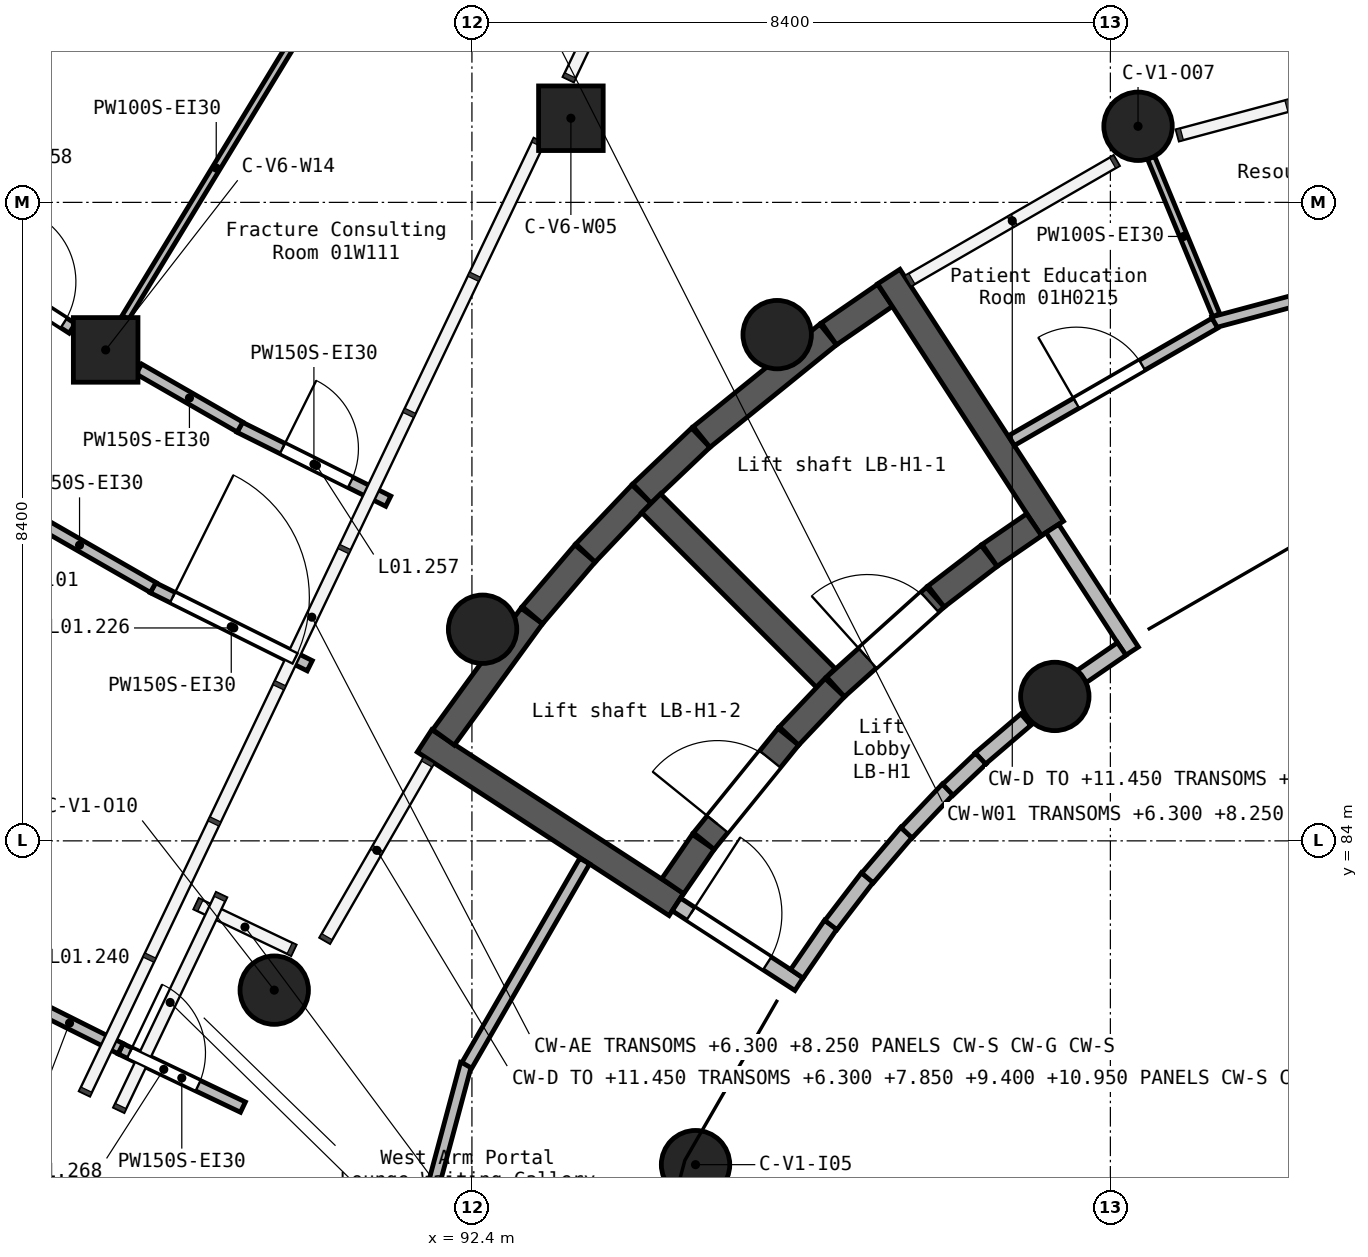
"""IFC4 building model, lengths in metres.
Left out: names, types, materials, properties, quantities, classifications, styles, units other than length and angle.
Written with IfcOpenShell. Run it as: python <this file> out.ifc"""

import sys

from ifc_helpers import new_model, si_unit, direction, frame, frame_2d, origin, origin_2d, place, context, subcontext, project, spatial, rectangle, circle, extrude, element, fill, save


model = new_model("IFC4")
c1 = context("Model", 3, precision=1e-05, world=origin(), true_north=direction((0.0, 1.0)))
c2 = subcontext(c1, "Body", "Model", "MODEL_VIEW")
j1 = project(units=[si_unit("LENGTHUNIT", "METRE"), si_unit("PLANEANGLEUNIT", "RADIAN")], contexts=[c1])
p1 = place(None, origin())
s1 = spatial("IfcSite", under=j1, at=p1, CompositionType="ELEMENT")
p2 = place(p1, origin())
s2 = spatial("IfcBuilding", under=s1, at=p2, CompositionType="ELEMENT")
p3 = place(p2, frame((0.0, 0.0, 5.4)))
s3 = spatial("IfcBuildingStorey", under=s2, at=p3, CompositionType="ELEMENT", Elevation=5.4)
p4 = place(p3, frame((87.581, 90.459, 0.0), z_axis=(0.0, 0.0, 1.0), x_axis=(1.0, 0.0, 0.0)))
e1 = element("IfcColumn", 1, at=p4, inside=s3, PredefinedType="COLUMN", context=c2, shape_type="SweptSolid", body=[
    extrude(rectangle(XDim=0.85, YDim=0.85, at=origin_2d()), origin(), (0.0, 0.0, 1.0), 4.5),
])
for number, where, z_axis, x_axis in (
    (2, (89.799, 82.036, 0.0), (0.0, 0.0, 1.0), (1.0, 0.0, 0.0)),
    (3, (92.54, 86.784, 0.0), (0.0, 0.0, 1.0), (1.0, 0.0, 0.0)),
):
    element("IfcColumn", number, at=place(p3, frame(where, z_axis=z_axis, x_axis=x_axis)), inside=s3, PredefinedType="COLUMN", context=c2, shape_type="SweptSolid", body=[
        extrude(circle(Radius=0.45, at=origin_2d()), origin(), (0.0, 0.0, 1.0), 4.5),
    ])
p5 = place(p3, frame((93.702, 93.507, 0.0), z_axis=(0.0, 0.0, 1.0), x_axis=(1.0, 0.0, 0.0)))
e4 = element("IfcColumn", 4, at=p5, inside=s3, PredefinedType="COLUMN", context=c2, shape_type="SweptSolid", body=[
    extrude(rectangle(XDim=0.85, YDim=0.85, at=origin_2d()), origin(), (0.0, 0.0, 1.0), 4.5),
])
for number, where, z_axis, x_axis in (
    (5, (95.342, 79.74, 0.0), (0.0, 0.0, 1.0), (1.0, 0.0, 0.0)),
    (6, (96.416, 90.66, 0.0), (0.0, 0.0, 1.0), (1.0, 0.0, 0.0)),
    (7, (100.069, 85.9, 0.0), (0.0, 0.0, 1.0), (1.0, 0.0, 0.0)),
    (8, (101.164, 93.401, 0.0), (0.0, 0.0, 1.0), (1.0, 0.0, 0.0)),
):
    element("IfcColumn", number, at=place(p3, frame(where, z_axis=z_axis, x_axis=x_axis)), inside=s3, PredefinedType="COLUMN", context=c2, shape_type="SweptSolid", body=[
        extrude(circle(Radius=0.45, at=origin_2d()), origin(), (0.0, 0.0, 1.0), 4.5),
    ])
p6 = place(p3, frame((91.776, 85.315, 0.0), z_axis=(0.0, 0.0, 1.0), x_axis=(0.838710342359, -0.544577782893, 0.0)))
e9 = element("IfcWall", 9, at=p6, inside=s3, PredefinedType="SHEAR", context=c2, shape_type="SweptSolid", body=[
    extrude(rectangle(XDim=3.951, YDim=0.35, at=frame_2d((1.976, 0.0))), origin(), (0.0, 0.0, 1.0), 4.5),
])
p7 = place(p3, frame((93.187, 86.958, 0.0), z_axis=(0.0, 0.0, 1.0), x_axis=(-0.588083467619, -0.808800244259, 0.0)))
e10 = element("IfcWall", 10, at=p7, inside=s3, PredefinedType="SHEAR", context=c2, shape_type="SweptSolid", body=[
    extrude(rectangle(XDim=1.974, YDim=0.35, at=frame_2d((0.987, 0.0))), origin(), (0.0, 0.0, 1.0), 4.5),
])
p8 = place(p3, frame((93.195, 86.969, 0.0), z_axis=(0.0, 0.0, 1.0), x_axis=(0.649301127712, 0.760531423119, 0.0)))
e11 = element("IfcWall", 11, at=p8, inside=s3, PredefinedType="SHEAR", context=c2, shape_type="SweptSolid", body=[
    extrude(rectangle(XDim=1.067, YDim=0.35, at=frame_2d((0.533, 0.0))), origin(), (0.0, 0.0, 1.0), 4.5),
])
p9 = place(p3, frame((93.894, 87.787, 0.0), z_axis=(0.0, 0.0, 1.0), x_axis=(0.688725463476, 0.725022231356, 0.0)))
e12 = element("IfcWall", 12, at=p9, inside=s3, PredefinedType="SHEAR", context=c2, shape_type="SweptSolid", body=[
    extrude(rectangle(XDim=1.07, YDim=0.35, at=frame_2d((0.535, 0.0))), origin(), (0.0, 0.0, 1.0), 4.5),
])
p10 = place(p3, frame((94.637, 88.569, 0.0), z_axis=(0.0, 0.0, 1.0), x_axis=(0.724948027673, 0.688803569367, 0.0)))
e13 = element("IfcWall", 13, at=p10, inside=s3, PredefinedType="SHEAR", context=c2, shape_type="SweptSolid", body=[
    extrude(rectangle(XDim=1.067, YDim=0.35, at=frame_2d((0.534, 0.0))), origin(), (0.0, 0.0, 1.0), 4.5),
])
p11 = place(p3, frame((94.758, 88.442, 0.0), z_axis=(0.0, 0.0, 1.0), x_axis=(0.707106781187, -0.707106781187, 0.0)))
e14 = element("IfcWall", 14, at=p11, inside=s3, PredefinedType="SHEAR", context=c2, shape_type="SweptSolid", body=[
    extrude(rectangle(XDim=3.249, YDim=0.35, at=frame_2d((1.625, 0.0))), origin(), (0.0, 0.0, 1.0), 4.5),
])
p12 = place(p3, frame((95.042, 83.403, 0.0), z_axis=(0.0, 0.0, 1.0), x_axis=(0.566587399165, 0.824001649942, 0.0)))
e15 = element("IfcWall", 15, at=p12, inside=s3, PredefinedType="SHEAR", context=c2, shape_type="SweptSolid", body=[
    extrude(rectangle(XDim=0.708, YDim=0.35, at=frame_2d((0.354, 0.0))), origin(), (0.0, 0.0, 1.0), 4.5),
])
p13 = place(p3, frame((95.451, 83.997, 0.0), z_axis=(0.0, 0.0, 1.0), x_axis=(0.629337420675, 0.777132170829, 0.0)))
e16 = element("IfcWall", 16, at=p13, inside=s3, PredefinedType="SHEAR", context=c2, shape_type="SweptSolid", body=[
    extrude(rectangle(XDim=1.766, YDim=0.35, at=frame_2d((0.883, 0.0))), origin(), (0.0, 0.0, 1.0), 4.5),
])
p14 = place(p13, frame((0.286, 0.0, 0.0)))
e17 = element("IfcOpeningElement", 17, at=p14, cuts=e16, PredefinedType="OPENING", context=c2, shape_type="SweptSolid", body=[
    extrude(rectangle(XDim=1.1, YDim=2.1, at=frame_2d((0.55, 1.05))), frame((0.0, 0.185, 0.0), z_axis=(0.0, -1.0, 0.0), x_axis=(1.0, 0.0, 0.0)), (0.0, 0.0, 1.0), 0.37),
])
p15 = place(p3, frame((96.572, 85.38, 0.0), z_axis=(0.0, 0.0, 1.0), x_axis=(0.687613208908, 0.726077182491, 0.0)))
e18 = element("IfcWall", 18, at=p15, inside=s3, PredefinedType="SHEAR", context=c2, shape_type="SweptSolid", body=[
    extrude(rectangle(XDim=0.876, YDim=0.35, at=frame_2d((0.438, 0.0))), origin(), (0.0, 0.0, 1.0), 4.5),
])
p16 = place(p3, frame((97.087, 90.662, 0.0), z_axis=(0.0, 0.0, 1.0), x_axis=(-0.777231602748, -0.629214618146, 0.0)))
e19 = element("IfcWall", 19, at=p16, inside=s3, PredefinedType="SHEAR", context=c2, shape_type="SweptSolid", body=[
    extrude(rectangle(XDim=2.143, YDim=0.35, at=frame_2d((1.071, 0.0))), origin(), (0.0, 0.0, 1.0), 4.5),
])
p17 = place(p3, frame((97.098, 90.67, 0.0), z_axis=(0.0, 0.0, 1.0), x_axis=(0.823914707919, 0.566713820261, 0.0)))
e20 = element("IfcWall", 20, at=p17, inside=s3, PredefinedType="SHEAR", context=c2, shape_type="SweptSolid", body=[
    extrude(rectangle(XDim=0.896, YDim=0.35, at=frame_2d((0.448, 0.0))), origin(), (0.0, 0.0, 1.0), 4.5),
])
p18 = place(p3, frame((97.184, 86.026, 0.0), z_axis=(0.0, 0.0, 1.0), x_axis=(0.743452252039, 0.668789016759, 0.0)))
e21 = element("IfcWall", 21, at=p18, inside=s3, PredefinedType="SHEAR", context=c2, shape_type="SweptSolid", body=[
    extrude(rectangle(XDim=1.766, YDim=0.35, at=frame_2d((0.883, 0.0))), origin(), (0.0, 0.0, 1.0), 4.5),
])
p19 = place(p18, frame((0.566, 0.0, 0.0)))
e22 = element("IfcOpeningElement", 22, at=p19, cuts=e21, PredefinedType="OPENING", context=c2, shape_type="SweptSolid", body=[
    extrude(rectangle(XDim=1.1, YDim=2.1, at=frame_2d((0.55, 1.05))), frame((0.0, 0.185, 0.0), z_axis=(0.0, -1.0, 0.0), x_axis=(1.0, 0.0, 0.0)), (0.0, 0.0, 1.0), 0.37),
])
p20 = place(p3, frame((97.885, 91.424, 0.0), z_axis=(0.0, 0.0, 1.0), x_axis=(0.544577782893, -0.838710342359, 0.0)))
e23 = element("IfcWall", 23, at=p20, inside=s3, PredefinedType="SHEAR", context=c2, shape_type="SweptSolid", body=[
    extrude(rectangle(XDim=3.951, YDim=0.35, at=frame_2d((1.976, 0.0))), origin(), (0.0, 0.0, 1.0), 4.5),
])
p21 = place(p3, frame((98.507, 87.215, 0.0), z_axis=(0.0, 0.0, 1.0), x_axis=(0.793181366791, 0.608985483715, 0.0)))
e24 = element("IfcWall", 24, at=p21, inside=s3, PredefinedType="SHEAR", context=c2, shape_type="SweptSolid", body=[
    extrude(rectangle(XDim=0.879, YDim=0.35, at=frame_2d((0.439, 0.0))), origin(), (0.0, 0.0, 1.0), 4.5),
])
p22 = place(p3, frame((99.212, 87.756, 0.0), z_axis=(0.0, 0.0, 1.0), x_axis=(0.824031893461, 0.566543412776, 0.0)))
e25 = element("IfcWall", 25, at=p22, inside=s3, PredefinedType="SHEAR", context=c2, shape_type="SweptSolid", body=[
    extrude(rectangle(XDim=0.71, YDim=0.35, at=frame_2d((0.355, 0.0))), origin(), (0.0, 0.0, 1.0), 4.5),
])
p23 = place(p3, frame((95.09, 83.164, 0.0), z_axis=(0.0, 0.0, 1.0), x_axis=(0.838626157518, -0.544707414973, 0.0)))
e26 = element("IfcWall", 26, at=p23, inside=s3, PredefinedType="SOLIDWALL", context=c2, shape_type="SweptSolid", body=[
    extrude(rectangle(XDim=1.925, YDim=0.2, at=frame_2d((0.962, 0.0))), origin(), (0.0, 0.0, 1.0), 4.15),
])
p24 = place(p23, frame((0.225, 0.0, 0.0)))
e27 = element("IfcOpeningElement", 27, at=p24, cuts=e26, PredefinedType="OPENING", context=c2, shape_type="SweptSolid", body=[
    extrude(rectangle(XDim=1.2, YDim=2.1, at=frame_2d((0.6, 1.05))), frame((0.0, 0.11, 0.0), z_axis=(0.0, -1.0, 0.0), x_axis=(1.0, 0.0, 0.0)), (0.0, 0.0, 1.0), 0.22),
])
p25 = place(p3, frame((100.036, 88.11, 0.0), z_axis=(0.0, 0.0, 1.0), x_axis=(0.544618190689, -0.838684104041, 0.0)))
e28 = element("IfcWall", 28, at=p25, inside=s3, PredefinedType="SOLIDWALL", context=c2, shape_type="SweptSolid", body=[
    extrude(rectangle(XDim=1.925, YDim=0.2, at=frame_2d((0.962, 0.0))), origin(), (0.0, 0.0, 1.0), 4.15),
])
p26 = place(p3, frame((100.383, 86.135, 0.0), z_axis=(0.0, 0.0, 1.0), x_axis=(0.823886668557, 0.56675458302, 0.0)))
e29 = element("IfcWall", 29, at=p26, inside=s3, PredefinedType="SOLIDWALL", context=c2, shape_type="SweptSolid", body=[
    extrude(rectangle(XDim=0.688, YDim=0.2, at=frame_2d((0.344, 0.0))), origin(), (0.0, 0.0, 1.0), 4.15),
])
p27 = place(p3, frame((96.675, 82.25, 0.0), z_axis=(0.0, 0.0, 1.0), x_axis=(0.566515670131, 0.824050966564, 0.0)))
e30 = element("IfcWall", 30, at=p27, inside=s3, PredefinedType="SOLIDWALL", context=c2, shape_type="SweptSolid", body=[
    extrude(rectangle(XDim=0.788, YDim=0.2, at=frame_2d((0.394, 0.0))), origin(), (0.0, 0.0, 1.0), 4.15),
])
p28 = place(p3, frame((97.123, 82.892, 0.0), z_axis=(0.0, 0.0, 1.0), x_axis=(0.608859474519, 0.793278097699, 0.0)))
e31 = element("IfcWall", 31, at=p28, inside=s3, PredefinedType="SOLIDWALL", context=c2, shape_type="SweptSolid", body=[
    extrude(rectangle(XDim=0.79, YDim=0.2, at=frame_2d((0.395, 0.0))), origin(), (0.0, 0.0, 1.0), 4.15),
])
for number, where, z_axis, x_axis in (
    (32, (97.605, 83.512, 0.0), (0.0, 0.0, 1.0), (0.649, 0.76, 0.0)),
    (33, (99.087, 85.082, 0.0), (0.0, 0.0, 1.0), (0.76, 0.649, 0.0)),
):
    element("IfcWall", number, at=place(p3, frame(where, z_axis=z_axis, x_axis=x_axis)), inside=s3, PredefinedType="SOLIDWALL", context=c2, shape_type="SweptSolid", body=[
        extrude(rectangle(XDim=0.79, YDim=0.2, at=frame_2d((0.395, 0.0))), origin(), (0.0, 0.0, 1.0), 4.15),
    ])
p29 = place(p3, frame((98.118, 84.106, 0.0), z_axis=(0.0, 0.0, 1.0), x_axis=(0.687693231893, 0.726001390363, 0.0)))
e34 = element("IfcWall", 34, at=p29, inside=s3, PredefinedType="SOLIDWALL", context=c2, shape_type="SweptSolid", body=[
    extrude(rectangle(XDim=0.79, YDim=0.2, at=frame_2d((0.395, 0.0))), origin(), (0.0, 0.0, 1.0), 4.15),
])
p30 = place(p3, frame((98.662, 84.672, 0.0), z_axis=(0.0, 0.0, 1.0), x_axis=(0.725920352122, 0.687778774298, 0.0)))
e35 = element("IfcWall", 35, at=p30, inside=s3, PredefinedType="SOLIDWALL", context=c2, shape_type="SweptSolid", body=[
    extrude(rectangle(XDim=0.595, YDim=0.2, at=frame_2d((0.298, 0.0))), origin(), (0.0, 0.0, 1.0), 4.15),
])
p31 = place(p3, frame((91.049, 76.312, 0.0), z_axis=(0.0, 0.0, 1.0), x_axis=(0.258927747961, 0.96589669289, 0.0)))
e36 = element("IfcWall", 36, at=p31, inside=s3, PredefinedType="PARTITIONING", context=c2, shape_type="SweptSolid", body=[
    extrude(rectangle(XDim=4.924, YDim=0.15, at=frame_2d((2.462, 0.0))), origin(), (0.0, 0.0, 1.0), 4.15),
])
p32 = place(p3, frame((102.153, 90.821, 0.0), z_axis=(0.0, 0.0, 1.0), x_axis=(0.965901416029, 0.258910128254, 0.0)))
e37 = element("IfcWall", 37, at=p32, inside=s3, PredefinedType="PARTITIONING", context=c2, shape_type="SweptSolid", body=[
    extrude(rectangle(XDim=4.908, YDim=0.15, at=frame_2d((2.454, 0.0))), origin(), (0.0, 0.0, 1.0), 4.15),
])
p33 = place(p32, frame((1.954, 0.0, 0.0)))
e38 = element("IfcOpeningElement", 38, at=p33, cuts=e37, PredefinedType="OPENING", context=c2, shape_type="SweptSolid", body=[
    extrude(rectangle(XDim=1.0, YDim=2.1, at=frame_2d((0.5, 1.05))), frame((0.0, 0.085, 0.0), z_axis=(0.0, -1.0, 0.0), x_axis=(1.0, 0.0, 0.0)), (0.0, 0.0, 1.0), 0.17),
])
p34 = place(p3, frame((92.333, 81.046, 0.0), z_axis=(0.0, 0.0, 1.0), x_axis=(0.499677038336, 0.866211785512, 0.0)))
e39 = element("IfcWall", 39, at=p34, inside=s3, PredefinedType="PARTITIONING", context=c2, shape_type="SweptSolid", body=[
    extrude(rectangle(XDim=3.103, YDim=0.15, at=frame_2d((1.551, 0.0))), origin(), (0.0, 0.0, 1.0), 4.15),
])
p35 = place(p3, frame((99.499, 89.266, 0.0), z_axis=(0.0, 0.0, 1.0), x_axis=(0.866071120369, 0.499920808191, 0.0)))
e40 = element("IfcWall", 40, at=p35, inside=s3, PredefinedType="PARTITIONING", context=c2, shape_type="SweptSolid", body=[
    extrude(rectangle(XDim=3.09, YDim=0.15, at=frame_2d((1.545, 0.0))), origin(), (0.0, 0.0, 1.0), 4.15),
])
p36 = place(p35, frame((0.985, 0.0, 0.0)))
e41 = element("IfcOpeningElement", 41, at=p36, cuts=e40, PredefinedType="OPENING", context=c2, shape_type="SweptSolid", body=[
    extrude(rectangle(XDim=1.0, YDim=2.1, at=frame_2d((0.5, 1.05))), frame((0.0, 0.085, 0.0), z_axis=(0.0, -1.0, 0.0), x_axis=(1.0, 0.0, 0.0)), (0.0, 0.0, 1.0), 0.17),
])
p37 = place(p3, frame((88.201, 87.331, 0.0), z_axis=(0.0, 0.0, 1.0), x_axis=(0.895335597875, -0.445392149883, 0.0)))
e42 = element("IfcWall", 42, at=p37, inside=s3, PredefinedType="PARTITIONING", context=c2, shape_type="SweptSolid", body=[
    extrude(rectangle(XDim=2.307, YDim=0.15, at=frame_2d((1.153, 0.0))), origin(), (0.0, 0.0, 1.0), 4.15),
])
p38 = place(p37, frame((0.291, 0.0, 0.0)))
e43 = element("IfcOpeningElement", 43, at=p38, cuts=e42, PredefinedType="OPENING", context=c2, shape_type="SweptSolid", body=[
    extrude(rectangle(XDim=1.8, YDim=2.1, at=frame_2d((0.9, 1.05))), frame((0.0, 0.085, 0.0), z_axis=(0.0, -1.0, 0.0), x_axis=(1.0, 0.0, 0.0)), (0.0, 0.0, 1.0), 0.17),
])
p39 = place(p3, frame((86.268, 88.446, 0.0), z_axis=(0.0, 0.0, 1.0), x_axis=(0.867212921502, -0.497937494852, 0.0)))
e44 = element("IfcWall", 44, at=p39, inside=s3, PredefinedType="PARTITIONING", context=c2, shape_type="SweptSolid", body=[
    extrude(rectangle(XDim=2.235, YDim=0.15, at=frame_2d((1.118, 0.0))), origin(), (0.0, 0.0, 1.0), 4.15),
])
p40 = place(p3, frame((89.343, 89.442, 0.0), z_axis=(0.0, 0.0, 1.0), x_axis=(0.895274815557, -0.445514314731, 0.0)))
e45 = element("IfcWall", 45, at=p40, inside=s3, PredefinedType="PARTITIONING", context=c2, shape_type="SweptSolid", body=[
    extrude(rectangle(XDim=2.185, YDim=0.15, at=frame_2d((1.092, 0.0))), origin(), (0.0, 0.0, 1.0), 4.15),
])
p41 = place(p40, frame((0.63, 0.0, 0.0)))
e46 = element("IfcOpeningElement", 46, at=p41, cuts=e45, PredefinedType="OPENING", context=c2, shape_type="SweptSolid", body=[
    extrude(rectangle(XDim=1.0, YDim=2.1, at=frame_2d((0.5, 1.05))), frame((0.0, 0.085, 0.0), z_axis=(0.0, -1.0, 0.0), x_axis=(1.0, 0.0, 0.0)), (0.0, 0.0, 1.0), 0.17),
])
p42 = place(p3, frame((85.744, 91.642, 0.0), z_axis=(0.0, 0.0, 1.0), x_axis=(0.840848932624, -0.54126987031, 0.0)))
e47 = element("IfcWall", 47, at=p42, inside=s3, PredefinedType="PARTITIONING", context=c2, shape_type="SweptSolid", body=[
    extrude(rectangle(XDim=1.662, YDim=0.15, at=frame_2d((0.831, 0.0))), origin(), (0.0, 0.0, 1.0), 4.15),
])
p43 = place(p42, frame((0.53, 0.0, 0.0)))
e48 = element("IfcOpeningElement", 48, at=p43, cuts=e47, PredefinedType="OPENING", context=c2, shape_type="SweptSolid", body=[
    extrude(rectangle(XDim=1.0, YDim=2.1, at=frame_2d((0.5, 1.05))), frame((0.0, 0.085, 0.0), z_axis=(0.0, -1.0, 0.0), x_axis=(1.0, 0.0, 0.0)), (0.0, 0.0, 1.0), 0.17),
])
p44 = place(p3, frame((88.018, 90.208, 0.0), z_axis=(0.0, 0.0, 1.0), x_axis=(0.867174234795, -0.498004865947, 0.0)))
e49 = element("IfcWall", 49, at=p44, inside=s3, PredefinedType="PARTITIONING", context=c2, shape_type="SweptSolid", body=[
    extrude(rectangle(XDim=1.535, YDim=0.15, at=frame_2d((0.768, 0.0))), origin(), (0.0, 0.0, 1.0), 4.15),
])
p45 = place(p3, frame((87.778, 81.264, 0.0), z_axis=(0.0, 0.0, 1.0), x_axis=(0.902574201286, -0.430534332166, 0.0)))
e50 = element("IfcWall", 50, at=p45, inside=s3, PredefinedType="PARTITIONING", context=c2, shape_type="SweptSolid", body=[
    extrude(rectangle(XDim=1.782, YDim=0.15, at=frame_2d((0.891, 0.0))), origin(), (0.0, 0.0, 1.0), 4.15),
])
p46 = place(p45, frame((0.129, 0.0, 0.0)))
e51 = element("IfcOpeningElement", 51, at=p46, cuts=e50, PredefinedType="OPENING", context=c2, shape_type="SweptSolid", body=[
    extrude(rectangle(XDim=1.0, YDim=2.1, at=frame_2d((0.5, 1.05))), frame((0.0, 0.085, 0.0), z_axis=(0.0, -1.0, 0.0), x_axis=(1.0, 0.0, 0.0)), (0.0, 0.0, 1.0), 0.17),
])
p47 = place(p3, frame((86.434, 81.938, 0.0), z_axis=(0.0, 0.0, 1.0), x_axis=(0.894297168166, -0.447473546717, 0.0)))
e52 = element("IfcWall", 52, at=p47, inside=s3, PredefinedType="PARTITIONING", context=c2, shape_type="SweptSolid", body=[
    extrude(rectangle(XDim=1.503, YDim=0.15, at=frame_2d((0.751, 0.0))), origin(), (0.0, 0.0, 1.0), 4.15),
])
p48 = place(p3, frame((84.418, 93.26, 0.0), z_axis=(0.0, 0.0, 1.0), x_axis=(0.603501117064, 0.797362152163, 0.0)))
e53 = element("IfcWall", 53, at=p48, inside=s3, PredefinedType="PARTITIONING", context=c2, shape_type="SweptSolid", body=[
    extrude(rectangle(XDim=4.522, YDim=0.1, at=frame_2d((2.261, 0.0))), origin(), (0.0, 0.0, 1.0), 4.15),
])
p49 = place(p3, frame((87.84, 90.885, 0.0), z_axis=(0.0, 0.0, 1.0), x_axis=(0.519618801015, 0.854398210223, 0.0)))
e54 = element("IfcWall", 54, at=p49, inside=s3, PredefinedType="PARTITIONING", context=c2, shape_type="SweptSolid", body=[
    extrude(rectangle(XDim=4.603, YDim=0.1, at=frame_2d((2.302, 0.0))), origin(), (0.0, 0.0, 1.0), 4.15),
])
p50 = place(p3, frame((101.335, 92.988, 0.0), z_axis=(0.0, 0.0, 1.0), x_axis=(0.382736345947, -0.923857613213, 0.0)))
e55 = element("IfcWall", 55, at=p50, inside=s3, PredefinedType="PARTITIONING", context=c2, shape_type="SweptSolid", body=[
    extrude(rectangle(XDim=2.243, YDim=0.1, at=frame_2d((1.121, 0.0))), origin(), (0.0, 0.0, 1.0), 4.15),
])
p51 = place(p38, origin())
e56 = element("IfcDoor", 56, at=p51, inside=s3, OperationType="DOUBLE_DOOR_SINGLE_SWING", PredefinedType="DOOR", context=c2, shape_type="SweptSolid", body=[
    extrude(rectangle(XDim=1.8, YDim=2.1, at=frame_2d((0.9, 1.05))), frame((0.0, 0.025, 0.0), z_axis=(0.0, -1.0, 0.0), x_axis=(1.0, 0.0, 0.0)), (0.0, 0.0, 1.0), 0.05),
])
fill(e43, e56)
p52 = place(p24, origin())
e57 = element("IfcDoor", 57, at=p52, inside=s3, OperationType="SINGLE_SWING_LEFT", PredefinedType="DOOR", context=c2, shape_type="SweptSolid", body=[
    extrude(rectangle(XDim=1.2, YDim=2.1, at=frame_2d((0.6, 1.05))), frame((0.0, 0.025, 0.0), z_axis=(0.0, -1.0, 0.0), x_axis=(1.0, 0.0, 0.0)), (0.0, 0.0, 1.0), 0.05),
])
fill(e27, e57)
p53 = place(p41, origin())
e58 = element("IfcDoor", 58, at=p53, inside=s3, OperationType="SINGLE_SWING_RIGHT", PredefinedType="DOOR", context=c2, shape_type="SweptSolid", body=[
    extrude(rectangle(XDim=1.0, YDim=2.1, at=frame_2d((0.5, 1.05))), frame((0.0, 0.025, 0.0), z_axis=(0.0, -1.0, 0.0), x_axis=(1.0, 0.0, 0.0)), (0.0, 0.0, 1.0), 0.05),
])
fill(e46, e58)
p54 = place(p43, origin())
e59 = element("IfcDoor", 59, at=p54, inside=s3, OperationType="SINGLE_SWING_RIGHT", PredefinedType="DOOR", context=c2, shape_type="SweptSolid", body=[
    extrude(rectangle(XDim=1.0, YDim=2.1, at=frame_2d((0.5, 1.05))), frame((0.0, 0.025, 0.0), z_axis=(0.0, -1.0, 0.0), x_axis=(1.0, 0.0, 0.0)), (0.0, 0.0, 1.0), 0.05),
])
fill(e48, e59)
p55 = place(p46, origin())
e60 = element("IfcDoor", 60, at=p55, inside=s3, OperationType="SINGLE_SWING_LEFT", PredefinedType="DOOR", context=c2, shape_type="SweptSolid", body=[
    extrude(rectangle(XDim=1.0, YDim=2.1, at=frame_2d((0.5, 1.05))), frame((0.0, 0.025, 0.0), z_axis=(0.0, -1.0, 0.0), x_axis=(1.0, 0.0, 0.0)), (0.0, 0.0, 1.0), 0.05),
])
fill(e51, e60)
p56 = place(p36, origin())
e61 = element("IfcDoor", 61, at=p56, inside=s3, OperationType="SINGLE_SWING_LEFT", PredefinedType="DOOR", context=c2, shape_type="SweptSolid", body=[
    extrude(rectangle(XDim=1.0, YDim=2.1, at=frame_2d((0.5, 1.05))), frame((0.0, 0.025, 0.0), z_axis=(0.0, -1.0, 0.0), x_axis=(1.0, 0.0, 0.0)), (0.0, 0.0, 1.0), 0.05),
])
fill(e41, e61)
p57 = place(p19, origin())
e62 = element("IfcDoor", 62, at=p57, inside=s3, OperationType="DOUBLE_DOOR_SLIDING", PredefinedType="DOOR", context=c2, shape_type="SweptSolid", body=[
    extrude(rectangle(XDim=1.1, YDim=2.1, at=frame_2d((0.55, 1.05))), frame((0.0, 0.025, 0.0), z_axis=(0.0, -1.0, 0.0), x_axis=(1.0, 0.0, 0.0)), (0.0, 0.0, 1.0), 0.05),
])
fill(e22, e62)
p58 = place(p14, origin())
e63 = element("IfcDoor", 63, at=p58, inside=s3, OperationType="DOUBLE_DOOR_SLIDING", PredefinedType="DOOR", context=c2, shape_type="SweptSolid", body=[
    extrude(rectangle(XDim=1.1, YDim=2.1, at=frame_2d((0.55, 1.05))), frame((0.0, 0.025, 0.0), z_axis=(0.0, -1.0, 0.0), x_axis=(1.0, 0.0, 0.0)), (0.0, 0.0, 1.0), 0.05),
])
fill(e17, e63)
save(model, sys.argv[1])
